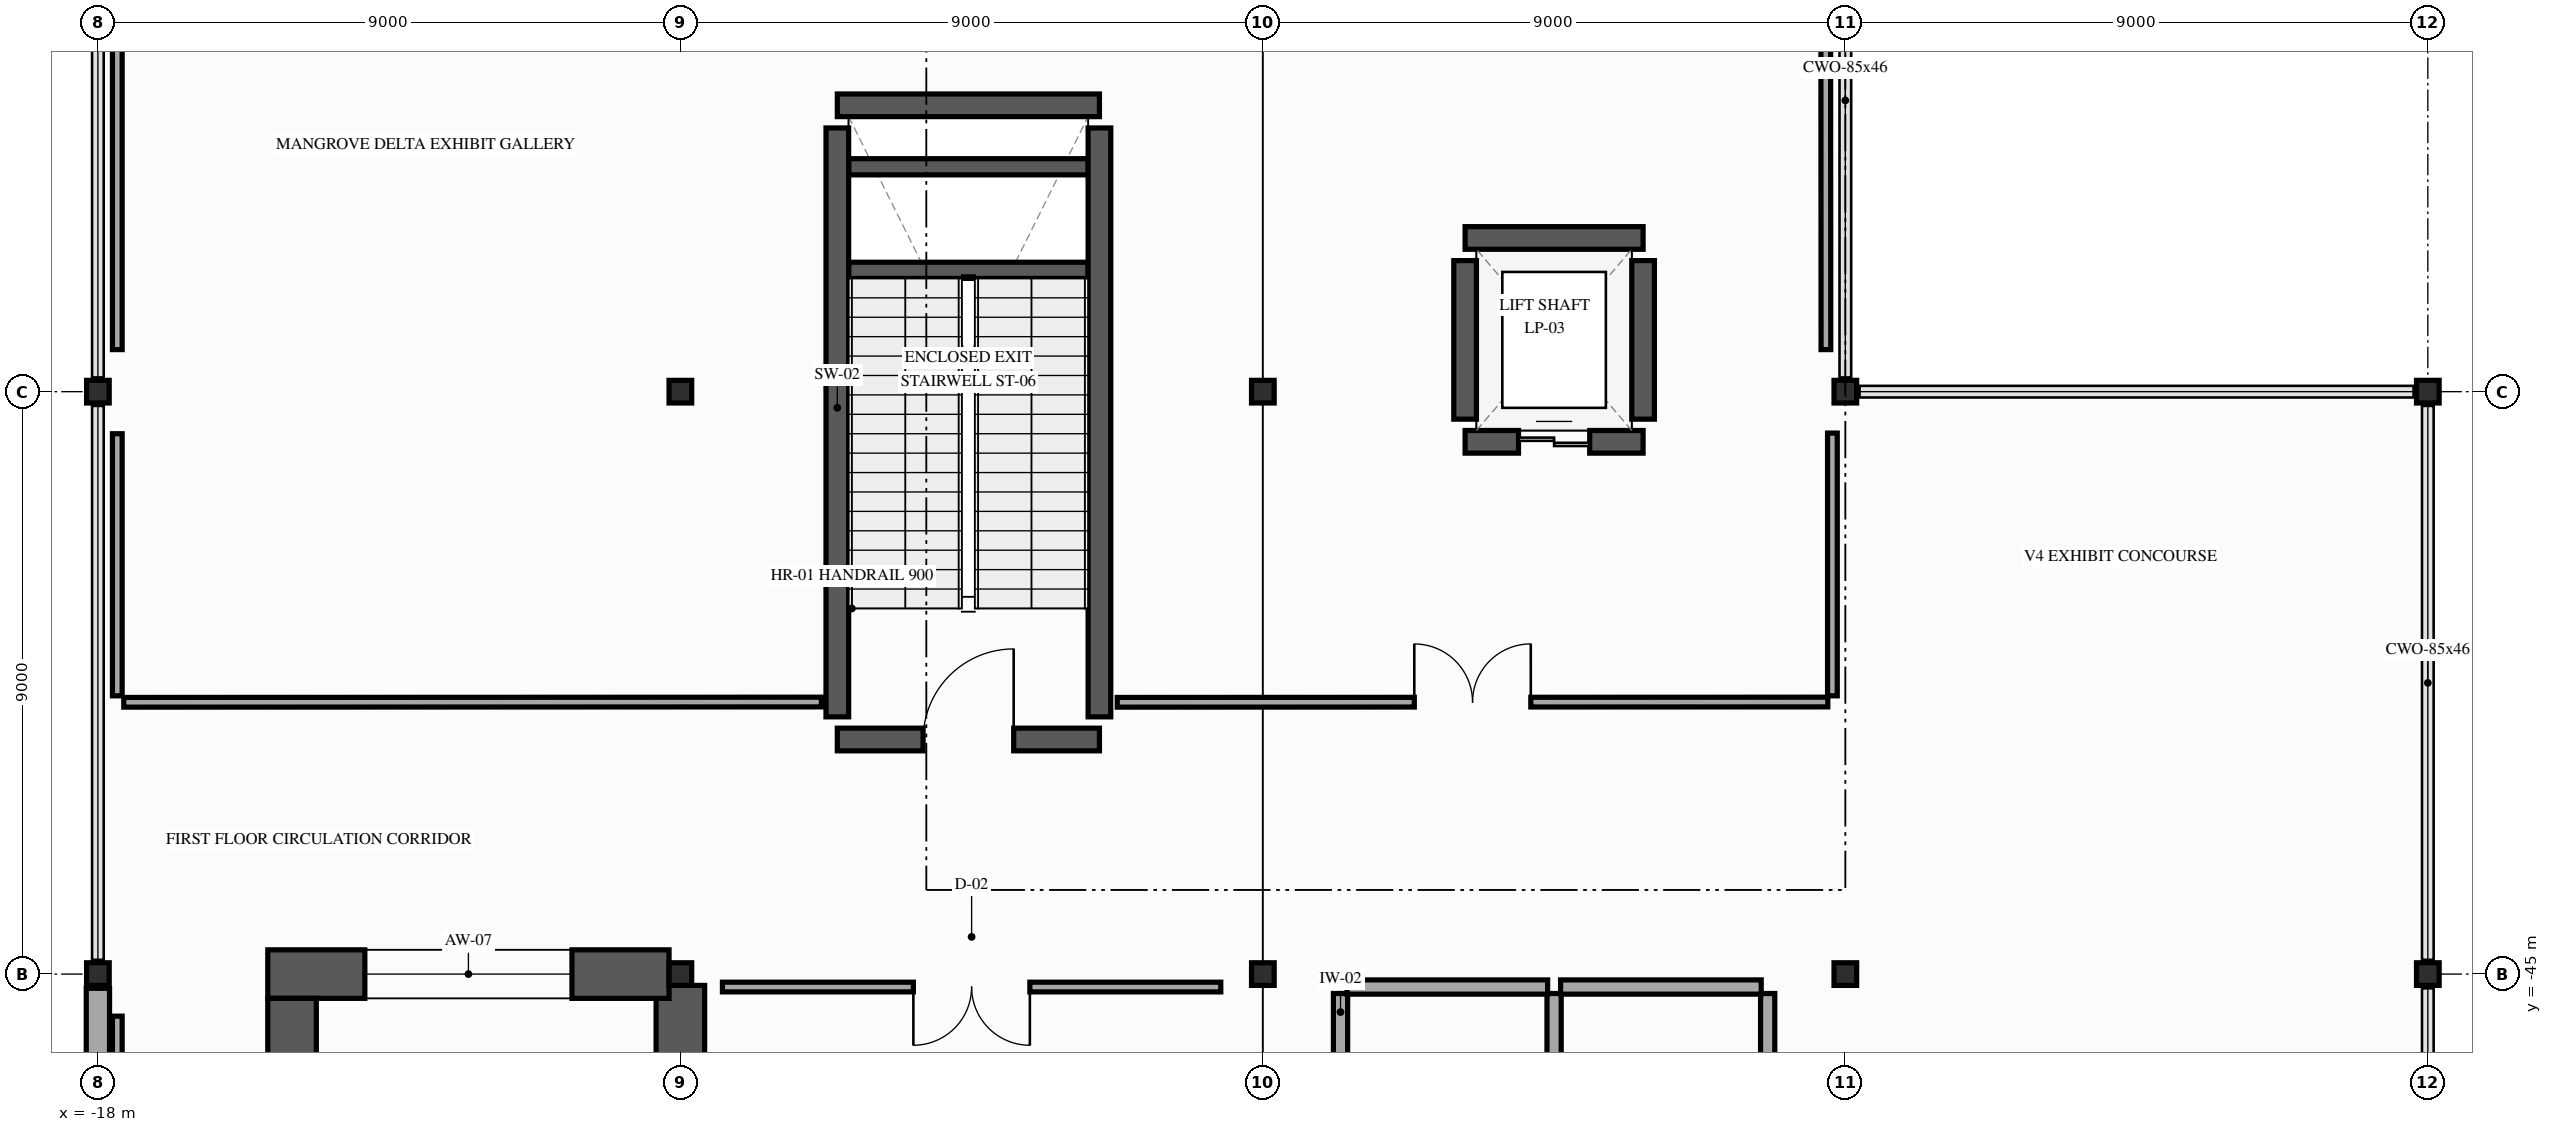
"""IFC4 building model, lengths in metres.
Left out: names, types, materials, properties, quantities, classifications, styles, units other than length and angle.
Written with IfcOpenShell. Run it as: python <this file> out.ifc"""

import sys

from ifc_helpers import new_model, si_unit, direction, frame, frame_2d, origin, origin_2d, place, context, subcontext, project, spatial, rectangle, i_section, extrude, element, fill, save


model = new_model("IFC4")
c1 = context("Model", 3, precision=1e-05, world=origin(), true_north=direction((0.0, 1.0)))
c2 = subcontext(c1, "Body", "Model", "MODEL_VIEW")
j1 = project(units=[si_unit("LENGTHUNIT", "METRE"), si_unit("PLANEANGLEUNIT", "RADIAN")], contexts=[c1])
p1 = place(None, origin())
s1 = spatial("IfcSite", under=j1, at=p1, CompositionType="ELEMENT")
p2 = place(p1, origin())
s2 = spatial("IfcBuilding", under=s1, at=p2, CompositionType="ELEMENT")
p3 = place(p2, frame((0.0, 0.0, 5.4)))
s3 = spatial("IfcBuildingStorey", under=s2, at=p3, CompositionType="ELEMENT", Elevation=5.4)
for number, where, z_axis, x_axis in (
    (1, (-18.0, -45.0, 0.0), (0.0, 0.0, 1.0), (1.0, 0.0, 0.0)),
    (2, (-18.0, -36.0, 0.0), (0.0, 0.0, 1.0), (1.0, 0.0, 0.0)),
    (3, (-9.0, -45.0, 0.0), (0.0, 0.0, 1.0), (1.0, 0.0, 0.0)),
    (4, (-9.0, -36.0, 0.0), (0.0, 0.0, 1.0), (1.0, 0.0, 0.0)),
    (5, (0.0, -45.0, 0.0), (0.0, 0.0, 1.0), (1.0, 0.0, 0.0)),
    (6, (0.0, -36.0, 0.0), (0.0, 0.0, 1.0), (1.0, 0.0, 0.0)),
    (7, (9.0, -45.0, 0.0), (0.0, 0.0, 1.0), (1.0, 0.0, 0.0)),
    (8, (9.0, -36.0, 0.0), (0.0, 0.0, 1.0), (1.0, 0.0, 0.0)),
    (9, (18.0, -45.0, 0.0), (0.0, 0.0, 1.0), (1.0, 0.0, 0.0)),
    (10, (18.0, -36.0, 0.0), (0.0, 0.0, 1.0), (1.0, 0.0, 0.0)),
):
    element("IfcColumn", number, at=place(p3, frame(where, z_axis=z_axis, x_axis=x_axis)), inside=s3, PredefinedType="COLUMN", context=c2, shape_type="SweptSolid", body=[
        extrude(i_section(OverallWidth=0.35, OverallDepth=0.35, WebThickness=0.012, FlangeThickness=0.019, FilletRadius=0.02, at=origin_2d()), origin(), (0.0, 0.0, 1.0), 5.4),
    ])
p4 = place(p3, frame((-9.0, -50.625, 0.0), z_axis=(0.0, 0.0, 1.0), x_axis=(0.0, 1.0, 0.0)))
e11 = element("IfcWall", 11, at=p4, inside=s3, PredefinedType="SHEAR", context=c2, shape_type="SweptSolid", body=[
    extrude(rectangle(XDim=5.45, YDim=0.75, at=frame_2d((2.725, 0.0))), origin(), (0.0, 0.0, 1.0), 4.5),
])
p5 = place(p3, frame((-9.175, -45.0, 0.0), z_axis=(0.0, 0.0, 1.0), x_axis=(-1.0, 0.0, 0.0)))
e12 = element("IfcWall", 12, at=p5, inside=s3, PredefinedType="SHEAR", context=c2, shape_type="SweptSolid", body=[
    extrude(rectangle(XDim=6.2, YDim=0.75, at=frame_2d((3.1, 0.0))), origin(), (0.0, 0.0, 1.0), 4.5),
])
p6 = place(p5, frame((1.5, 0.0, 0.8)))
e13 = element("IfcOpeningElement", 13, at=p6, cuts=e12, PredefinedType="OPENING", context=c2, shape_type="SweptSolid", body=[
    extrude(rectangle(XDim=3.2, YDim=2.2, at=frame_2d((1.6, 1.1))), frame((0.0, 0.385, 0.0), z_axis=(0.0, -1.0, 0.0), x_axis=(1.0, 0.0, 0.0)), (0.0, 0.0, 1.0), 0.77),
])
p7 = place(p3, frame((-15.0, -45.375, 0.0), z_axis=(0.0, 0.0, 1.0), x_axis=(0.0, -1.0, 0.0)))
e14 = element("IfcWall", 14, at=p7, inside=s3, PredefinedType="SHEAR", context=c2, shape_type="SweptSolid", body=[
    extrude(rectangle(XDim=5.25, YDim=0.75, at=frame_2d((2.625, 0.0))), origin(), (0.0, 0.0, 1.0), 4.5),
])
p8 = place(p3, frame((-18.0, -55.255, 0.0), z_axis=(0.0, 0.0, 1.0), x_axis=(0.0, 1.0, 0.0)))
e15 = element("IfcWall", 15, at=p8, inside=s3, PredefinedType="SOLIDWALL", context=c2, shape_type="SweptSolid", body=[
    extrude(rectangle(XDim=10.035, YDim=0.36, at=frame_2d((5.018, 0.0))), origin(), (0.0, 0.0, 1.0), 4.537),
])
p9 = place(p8, frame((4.493, 0.0, 0.9)))
e16 = element("IfcOpeningElement", 16, at=p9, cuts=e15, PredefinedType="OPENING", context=c2, shape_type="SweptSolid", body=[
    extrude(rectangle(XDim=1.05, YDim=2.0, at=frame_2d((0.525, 1.0))), frame((0.0, 0.19, 0.0), z_axis=(0.0, -1.0, 0.0), x_axis=(1.0, 0.0, 0.0)), (0.0, 0.0, 1.0), 0.38),
])
for number, where, z_axis, x_axis in (
    (17, (-6.4, -34.125, 0.0), (0.0, 0.0, 1.0), (1.0, 0.0, 0.0)),
    (18, (-6.4, -32.525, 0.0), (0.0, 0.0, 1.0), (1.0, 0.0, 0.0)),
):
    element("IfcWall", number, at=place(p3, frame(where, z_axis=z_axis, x_axis=x_axis)), inside=s3, PredefinedType="SHEAR", context=c2, shape_type="SweptSolid", body=[
        extrude(rectangle(XDim=3.7, YDim=0.25, at=frame_2d((1.85, 0.0))), origin(), (0.0, 0.0, 1.0), 2.5),
    ])
p10 = place(p3, frame((-6.575, -41.375, 0.0), z_axis=(0.0, 0.0, 1.0), x_axis=(1.0, 0.0, 0.0)))
e19 = element("IfcWall", 19, at=p10, inside=s3, PredefinedType="SHEAR", context=c2, shape_type="SweptSolid", body=[
    extrude(rectangle(XDim=4.05, YDim=0.35, at=frame_2d((2.025, 0.0))), origin(), (0.0, 0.0, 1.0), 5.15),
])
p11 = place(p10, frame((1.325, 0.0, 0.0)))
e20 = element("IfcOpeningElement", 20, at=p11, cuts=e19, PredefinedType="OPENING", context=c2, shape_type="SweptSolid", body=[
    extrude(rectangle(XDim=1.4, YDim=2.2, at=frame_2d((0.7, 1.1))), frame((0.0, 0.185, 0.0), z_axis=(0.0, -1.0, 0.0), x_axis=(1.0, 0.0, 0.0)), (0.0, 0.0, 1.0), 0.37),
])
p12 = place(p3, frame((-6.575, -31.575, 0.0), z_axis=(0.0, 0.0, 1.0), x_axis=(1.0, 0.0, 0.0)))
e21 = element("IfcWall", 21, at=p12, inside=s3, PredefinedType="SHEAR", context=c2, shape_type="SweptSolid", body=[
    extrude(rectangle(XDim=4.05, YDim=0.35, at=frame_2d((2.025, 0.0))), origin(), (0.0, 0.0, 1.0), 5.15),
])
for number, where, z_axis, x_axis in (
    (22, (-6.575, -41.025, 0.0), (0.0, 0.0, 1.0), (0.0, 1.0, 0.0)),
    (23, (-2.525, -41.025, 0.0), (0.0, 0.0, 1.0), (0.0, 1.0, 0.0)),
):
    element("IfcWall", number, at=place(p3, frame(where, z_axis=z_axis, x_axis=x_axis)), inside=s3, PredefinedType="SHEAR", context=c2, shape_type="SweptSolid", body=[
        extrude(rectangle(XDim=9.1, YDim=0.35, at=frame_2d((4.55, 0.0))), origin(), (0.0, 0.0, 1.0), 5.15),
    ])
p13 = place(p3, frame((3.125, -36.775, 0.0), z_axis=(0.0, 0.0, 1.0), x_axis=(1.0, 0.0, 0.0)))
e24 = element("IfcWall", 24, at=p13, inside=s3, PredefinedType="SHEAR", context=c2, shape_type="SweptSolid", body=[
    extrude(rectangle(XDim=2.75, YDim=0.35, at=frame_2d((1.375, 0.0))), origin(), (0.0, 0.0, 1.0), 5.15),
])
p14 = place(p13, frame((0.825, 0.0, 0.0)))
e25 = element("IfcOpeningElement", 25, at=p14, cuts=e24, PredefinedType="OPENING", context=c2, shape_type="SweptSolid", body=[
    extrude(rectangle(XDim=1.1, YDim=2.2, at=frame_2d((0.55, 1.1))), frame((0.0, 0.185, 0.0), z_axis=(0.0, -1.0, 0.0), x_axis=(1.0, 0.0, 0.0)), (0.0, 0.0, 1.0), 0.37),
])
p15 = place(p3, frame((5.875, -33.625, 0.0), z_axis=(0.0, 0.0, 1.0), x_axis=(-1.0, 0.0, 0.0)))
e26 = element("IfcWall", 26, at=p15, inside=s3, PredefinedType="SHEAR", context=c2, shape_type="SweptSolid", body=[
    extrude(rectangle(XDim=2.75, YDim=0.35, at=frame_2d((1.375, 0.0))), origin(), (0.0, 0.0, 1.0), 5.15),
])
for number, where, z_axis, x_axis in (
    (27, (3.125, -36.425, 0.0), (0.0, 0.0, 1.0), (0.0, 1.0, 0.0)),
    (28, (5.875, -36.425, 0.0), (0.0, 0.0, 1.0), (0.0, 1.0, 0.0)),
):
    element("IfcWall", number, at=place(p3, frame(where, z_axis=z_axis, x_axis=x_axis)), inside=s3, PredefinedType="SHEAR", context=c2, shape_type="SweptSolid", body=[
        extrude(rectangle(XDim=2.45, YDim=0.35, at=frame_2d((1.225, 0.0))), origin(), (0.0, 0.0, 1.0), 5.15),
    ])
p16 = place(p3, frame((1.2, -45.3, 0.0), z_axis=(0.0, 0.0, 1.0), x_axis=(0.0, -1.0, 0.0)))
e29 = element("IfcWall", 29, at=p16, inside=s3, PredefinedType="PLUMBINGWALL", context=c2, shape_type="SweptSolid", body=[
    extrude(rectangle(XDim=4.6, YDim=0.22, at=frame_2d((2.3, 0.0))), origin(), (0.0, 0.0, 1.0), 4.537),
])
p17 = place(p16, frame((1.775, 0.0, 0.0)))
e30 = element("IfcOpeningElement", 30, at=p17, cuts=e29, PredefinedType="OPENING", context=c2, shape_type="SweptSolid", body=[
    extrude(rectangle(XDim=1.05, YDim=2.15, at=frame_2d((0.525, 1.075))), frame((0.0, 0.12, 0.0), z_axis=(0.0, -1.0, 0.0), x_axis=(1.0, 0.0, 0.0)), (0.0, 0.0, 1.0), 0.24),
])
p18 = place(p3, frame((4.5, -49.9, 0.0), z_axis=(0.0, 0.0, 1.0), x_axis=(0.0, 1.0, 0.0)))
e31 = element("IfcWall", 31, at=p18, inside=s3, PredefinedType="PLUMBINGWALL", context=c2, shape_type="SweptSolid", body=[
    extrude(rectangle(XDim=4.6, YDim=0.22, at=frame_2d((2.3, 0.0))), origin(), (0.0, 0.0, 1.0), 4.537),
])
p19 = place(p3, frame((4.4, -45.2, 0.0), z_axis=(0.0, 0.0, 1.0), x_axis=(-1.0, 0.0, 0.0)))
e32 = element("IfcWall", 32, at=p19, inside=s3, PredefinedType="PLUMBINGWALL", context=c2, shape_type="SweptSolid", body=[
    extrude(rectangle(XDim=3.1, YDim=0.22, at=frame_2d((1.55, 0.0))), origin(), (0.0, 0.0, 1.0), 4.537),
])
p20 = place(p3, frame((7.8, -49.9, 0.0), z_axis=(0.0, 0.0, 1.0), x_axis=(0.0, 1.0, 0.0)))
e33 = element("IfcWall", 33, at=p20, inside=s3, PredefinedType="PLUMBINGWALL", context=c2, shape_type="SweptSolid", body=[
    extrude(rectangle(XDim=4.6, YDim=0.22, at=frame_2d((2.3, 0.0))), origin(), (0.0, 0.0, 1.0), 4.537),
])
p21 = place(p20, frame((1.825, 0.0, 0.0)))
e34 = element("IfcOpeningElement", 34, at=p21, cuts=e33, PredefinedType="OPENING", context=c2, shape_type="SweptSolid", body=[
    extrude(rectangle(XDim=0.95, YDim=2.15, at=frame_2d((0.475, 1.075))), frame((0.0, 0.12, 0.0), z_axis=(0.0, -1.0, 0.0), x_axis=(1.0, 0.0, 0.0)), (0.0, 0.0, 1.0), 0.24),
])
p22 = place(p3, frame((7.7, -45.2, 0.0), z_axis=(0.0, 0.0, 1.0), x_axis=(-1.0, 0.0, 0.0)))
e35 = element("IfcWall", 35, at=p22, inside=s3, PredefinedType="PLUMBINGWALL", context=c2, shape_type="SweptSolid", body=[
    extrude(rectangle(XDim=3.1, YDim=0.22, at=frame_2d((1.55, 0.0))), origin(), (0.0, 0.0, 1.0), 4.537),
])
p23 = place(p3, frame((-0.65, -45.2, 0.0), z_axis=(0.0, 0.0, 1.0), x_axis=(-1.0, 0.0, 0.0)))
e36 = element("IfcWall", 36, at=p23, inside=s3, PredefinedType="PARTITIONING", context=c2, shape_type="SweptSolid", body=[
    extrude(rectangle(XDim=7.7, YDim=0.15, at=frame_2d((3.85, 0.0))), origin(), (0.0, 0.0, 1.0), 4.537),
])
p24 = place(p23, frame((2.95, 0.0, 0.0)))
e37 = element("IfcOpeningElement", 37, at=p24, cuts=e36, PredefinedType="OPENING", context=c2, shape_type="SweptSolid", body=[
    extrude(rectangle(XDim=1.8, YDim=2.3, at=frame_2d((0.9, 1.15))), frame((0.0, 0.085, 0.0), z_axis=(0.0, -1.0, 0.0), x_axis=(1.0, 0.0, 0.0)), (0.0, 0.0, 1.0), 0.17),
])
p25 = place(p3, frame((-17.7, -45.65, 0.0), z_axis=(0.0, 0.0, 1.0), x_axis=(0.0, -1.0, 0.0)))
e38 = element("IfcWall", 38, at=p25, inside=s3, PredefinedType="PARTITIONING", context=c2, shape_type="SweptSolid", body=[
    extrude(rectangle(XDim=9.5, YDim=0.15, at=frame_2d((4.75, 0.0))), origin(), (0.0, 0.0, 1.0), 4.637),
])
p26 = place(p3, frame((-17.7, -36.65, 0.0), z_axis=(0.0, 0.0, 1.0), x_axis=(0.0, -1.0, 0.0)))
e39 = element("IfcWall", 39, at=p26, inside=s3, PredefinedType="PARTITIONING", context=c2, shape_type="SweptSolid", body=[
    extrude(rectangle(XDim=4.05, YDim=0.15, at=frame_2d((2.025, 0.0))), origin(), (0.0, 0.0, 1.0), 4.637),
])
p27 = place(p3, frame((-17.6, -40.8, 0.0), z_axis=(0.0, 0.0, 1.0), x_axis=(0.999999925871, 0.000385042213, 0.0)))
e40 = element("IfcWall", 40, at=p27, inside=s3, PredefinedType="PARTITIONING", context=c2, shape_type="SweptSolid", body=[
    extrude(rectangle(XDim=10.779, YDim=0.15, at=frame_2d((5.39, 0.0))), origin(), (0.0, 0.0, 1.0), 4.637),
])
p28 = place(p3, frame((-2.25, -40.8, 0.0), z_axis=(0.0, 0.0, 1.0), x_axis=(0.999999928547, 0.000378029771, 0.0)))
e41 = element("IfcWall", 41, at=p28, inside=s3, PredefinedType="PARTITIONING", context=c2, shape_type="SweptSolid", body=[
    extrude(rectangle(XDim=10.979, YDim=0.15, at=frame_2d((5.49, 0.0))), origin(), (0.0, 0.0, 1.0), 4.637),
])
p29 = place(p28, frame((4.59, 0.0, 0.0)))
e42 = element("IfcOpeningElement", 42, at=p29, cuts=e41, PredefinedType="OPENING", context=c2, shape_type="SweptSolid", body=[
    extrude(rectangle(XDim=1.8, YDim=2.3, at=frame_2d((0.9, 1.15))), frame((0.0, 0.085, 0.0), z_axis=(0.0, -1.0, 0.0), x_axis=(1.0, 0.0, 0.0)), (0.0, 0.0, 1.0), 0.17),
])
p30 = place(p3, frame((8.8, -40.7, 0.0), z_axis=(0.0, 0.0, 1.0), x_axis=(0.0, 1.0, 0.0)))
e43 = element("IfcWall", 43, at=p30, inside=s3, PredefinedType="PARTITIONING", context=c2, shape_type="SweptSolid", body=[
    extrude(rectangle(XDim=4.06, YDim=0.15, at=frame_2d((2.03, 0.0))), origin(), (0.0, 0.0, 1.0), 4.637),
])
p31 = place(p3, frame((8.7, -35.35, 0.0), z_axis=(0.0, 0.0, 1.0), x_axis=(-0.00050663367, 0.999999871661, 0.0)))
e44 = element("IfcWall", 44, at=p31, inside=s3, PredefinedType="PARTITIONING", context=c2, shape_type="SweptSolid", body=[
    extrude(rectangle(XDim=7.71, YDim=0.15, at=frame_2d((3.855, 0.0))), origin(), (0.0, 0.0, 1.0), 4.637),
])
p32 = place(p3, frame((-17.7, -27.65, 0.0), z_axis=(0.0, 0.0, 1.0), x_axis=(0.0, -1.0, 0.0)))
e45 = element("IfcWall", 45, at=p32, inside=s3, PredefinedType="PARTITIONING", context=c2, shape_type="SweptSolid", body=[
    extrude(rectangle(XDim=7.7, YDim=0.15, at=frame_2d((3.85, 0.0))), origin(), (0.0, 0.0, 1.0), 4.637),
])
p33 = place(p6, origin())
e46 = element("IfcWindow", 46, at=p33, inside=s3, PartitioningType="SINGLE_PANEL", PredefinedType="WINDOW", context=c2, shape_type="SweptSolid", body=[
    extrude(rectangle(XDim=3.2, YDim=2.2, at=frame_2d((1.6, 1.1))), frame((0.0, 0.03, 0.0), z_axis=(0.0, -1.0, 0.0), x_axis=(1.0, 0.0, 0.0)), (0.0, 0.0, 1.0), 0.06),
])
fill(e13, e46)
p34 = place(p11, origin())
e47 = element("IfcDoor", 47, at=p34, inside=s3, OperationType="SINGLE_SWING_RIGHT", PredefinedType="DOOR", context=c2, shape_type="SweptSolid", body=[
    extrude(rectangle(XDim=1.4, YDim=2.2, at=frame_2d((0.7, 1.1))), frame((0.0, 0.025, 0.0), z_axis=(0.0, -1.0, 0.0), x_axis=(1.0, 0.0, 0.0)), (0.0, 0.0, 1.0), 0.05),
])
fill(e20, e47)
p35 = place(p14, origin())
e48 = element("IfcDoor", 48, at=p35, inside=s3, OperationType="DOUBLE_DOOR_SLIDING", PredefinedType="DOOR", context=c2, shape_type="SweptSolid", body=[
    extrude(rectangle(XDim=1.1, YDim=2.2, at=frame_2d((0.55, 1.1))), frame((0.0, 0.025, 0.0), z_axis=(0.0, -1.0, 0.0), x_axis=(1.0, 0.0, 0.0)), (0.0, 0.0, 1.0), 0.05),
])
fill(e25, e48)
p36 = place(p24, origin())
e49 = element("IfcDoor", 49, at=p36, inside=s3, OperationType="DOUBLE_DOOR_SINGLE_SWING", PredefinedType="DOOR", context=c2, shape_type="SweptSolid", body=[
    extrude(rectangle(XDim=1.8, YDim=2.3, at=frame_2d((0.9, 1.15))), frame((0.0, 0.025, 0.0), z_axis=(0.0, -1.0, 0.0), x_axis=(1.0, 0.0, 0.0)), (0.0, 0.0, 1.0), 0.05),
])
fill(e37, e49)
p37 = place(p29, origin())
e50 = element("IfcDoor", 50, at=p37, inside=s3, OperationType="DOUBLE_DOOR_SINGLE_SWING", PredefinedType="DOOR", context=c2, shape_type="SweptSolid", body=[
    extrude(rectangle(XDim=1.8, YDim=2.3, at=frame_2d((0.9, 1.15))), frame((0.0, 0.025, 0.0), z_axis=(0.0, -1.0, 0.0), x_axis=(1.0, 0.0, 0.0)), (0.0, 0.0, 1.0), 0.05),
])
fill(e42, e50)
save(model, sys.argv[1])
